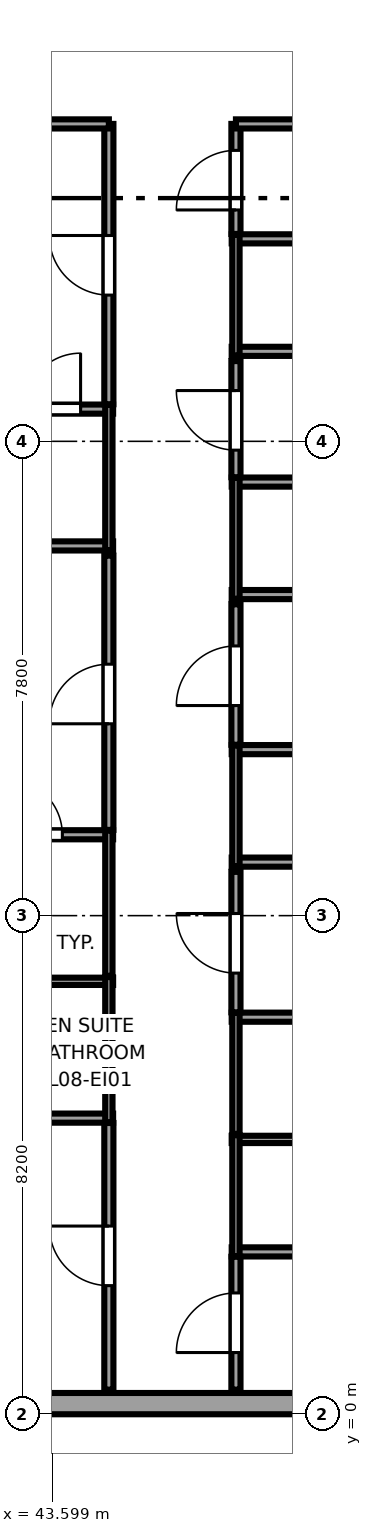
"""IFC4 building model, lengths in metres.
Left out: names, types, materials, properties, quantities, classifications, styles, units other than length and angle.
Written with IfcOpenShell. Run it as: python <this file> out.ifc"""

import sys

from ifc_helpers import new_model, si_unit, direction, frame, frame_2d, origin, place, context, subcontext, project, spatial, rectangle, extrude, source, transform, mapped, element, fill, save


model = new_model("IFC4")
c1 = context("Model", 3, precision=1e-05, world=origin(), true_north=direction((0.0, 1.0)))
c2 = subcontext(c1, "Body", "Model", "MODEL_VIEW")
j1 = project(units=[si_unit("LENGTHUNIT", "METRE"), si_unit("PLANEANGLEUNIT", "RADIAN")], contexts=[c1])
p1 = place(None, origin())
s1 = spatial("IfcSite", under=j1, at=p1, CompositionType="ELEMENT")
p2 = place(p1, origin())
s2 = spatial("IfcBuilding", under=s1, at=p2, CompositionType="ELEMENT")
p3 = place(p2, frame((0.0, 0.0, 39.1)))
s3 = spatial("IfcBuildingStorey", under=s2, at=p3, CompositionType="ELEMENT", Elevation=39.1)
p4 = place(p3, frame((34.375, 0.175, 0.0), z_axis=(0.0, 0.0, 1.0), x_axis=(1.0, 0.0, 0.0)))
e1 = element("IfcWall", 1, at=p4, inside=s3, PredefinedType="SOLIDWALL", context=c2, shape_type="SweptSolid", body=[
    extrude(rectangle(XDim=18.008, YDim=0.35, at=frame_2d((9.004, 0.0))), origin(), (0.0, 0.0, 1.0), 3.37),
])
p5 = place(p4, frame((1.801, 0.0, 0.68)))
e2 = element("IfcOpeningElement", 2, at=p5, cuts=e1, PredefinedType="OPENING", context=c2, shape_type="SweptSolid", body=[
    extrude(rectangle(XDim=1.8, YDim=1.85, at=frame_2d((0.9, 0.925))), frame((0.0, 0.185, 0.0), z_axis=(0.0, -1.0, 0.0), x_axis=(1.0, 0.0, 0.0)), (0.0, 0.0, 1.0), 0.37),
])
p6 = place(p4, frame((15.725, 0.0, 0.62)))
e3 = element("IfcOpeningElement", 3, at=p6, cuts=e1, PredefinedType="OPENING", context=c2, shape_type="SweptSolid", body=[
    extrude(rectangle(XDim=1.5, YDim=1.55, at=frame_2d((0.75, 0.775))), frame((0.0, 0.185, 0.0), z_axis=(0.0, -1.0, 0.0), x_axis=(1.0, 0.0, 0.0)), (0.0, 0.0, 1.0), 0.37),
])
p7 = place(p3, frame((42.01, 4.87, 0.0), z_axis=(0.0, 0.0, 1.0), x_axis=(1.0, 0.0, 0.0)))
e4 = element("IfcWall", 4, at=p7, inside=s3, PredefinedType="PARTITIONING", context=c2, shape_type="SweptSolid", body=[
    extrude(rectangle(XDim=2.59, YDim=0.15, at=frame_2d((1.295, 0.0))), origin(), (0.0, 0.0, 1.0), 3.37),
])
p8 = place(p3, frame((42.01, 7.12, 0.0), z_axis=(0.0, 0.0, 1.0), x_axis=(1.0, 0.0, 0.0)))
e5 = element("IfcWall", 5, at=p8, inside=s3, PredefinedType="PLUMBINGWALL", context=c2, shape_type="SweptSolid", body=[
    extrude(rectangle(XDim=2.59, YDim=0.12, at=frame_2d((1.295, 0.0))), origin(), (0.0, 0.0, 1.0), 3.37),
])
p9 = place(p3, frame((44.53, 4.8, 0.0), z_axis=(0.0, 0.0, 1.0), x_axis=(0.0, 1.0, 0.0)))
e6 = element("IfcWall", 6, at=p9, inside=s3, PredefinedType="PLUMBINGWALL", context=c2, shape_type="SweptSolid", body=[
    extrude(rectangle(XDim=2.39, YDim=0.12, at=frame_2d((1.195, 0.0))), origin(), (0.0, 0.0, 1.0), 3.37),
])
p10 = place(p3, frame((42.01, 9.53, 0.0), z_axis=(0.0, 0.0, 1.0), x_axis=(1.0, 0.0, 0.0)))
e7 = element("IfcWall", 7, at=p10, inside=s3, PredefinedType="PARTITIONING", context=c2, shape_type="SweptSolid", body=[
    extrude(rectangle(XDim=2.59, YDim=0.15, at=frame_2d((1.295, 0.0))), origin(), (0.0, 0.0, 1.0), 3.37),
])
p11 = place(p10, frame((0.835, 0.0, 0.0)))
e8 = element("IfcOpeningElement", 8, at=p11, cuts=e7, PredefinedType="OPENING", context=c2, shape_type="SweptSolid", body=[
    extrude(rectangle(XDim=0.92, YDim=2.01, at=frame_2d((0.46, 1.005))), frame((0.0, 0.085, 0.0), z_axis=(0.0, -1.0, 0.0), x_axis=(1.0, 0.0, 0.0)), (0.0, 0.0, 1.0), 0.17),
])
p12 = place(p3, frame((44.53, 7.21, 0.0), z_axis=(0.0, 0.0, 1.0), x_axis=(0.0, 1.0, 0.0)))
e9 = element("IfcWall", 9, at=p12, inside=s3, PredefinedType="PLUMBINGWALL", context=c2, shape_type="SweptSolid", body=[
    extrude(rectangle(XDim=2.39, YDim=0.12, at=frame_2d((1.195, 0.0))), origin(), (0.0, 0.0, 1.0), 3.37),
])
p13 = place(p3, frame((34.65, 14.28, 0.0), z_axis=(0.0, 0.0, 1.0), x_axis=(1.0, 0.0, 0.0)))
e10 = element("IfcWall", 10, at=p13, inside=s3, PredefinedType="PARTITIONING", context=c2, shape_type="SweptSolid", body=[
    extrude(rectangle(XDim=9.95, YDim=0.15, at=frame_2d((4.975, 0.0))), origin(), (0.0, 0.0, 1.0), 3.37),
])
p14 = place(p3, frame((42.01, 16.53, 0.0), z_axis=(0.0, 0.0, 1.0), x_axis=(1.0, 0.0, 0.0)))
e11 = element("IfcWall", 11, at=p14, inside=s3, PredefinedType="PARTITIONING", context=c2, shape_type="SweptSolid", body=[
    extrude(rectangle(XDim=2.59, YDim=0.15, at=frame_2d((1.295, 0.0))), origin(), (0.0, 0.0, 1.0), 3.37),
])
p15 = place(p14, frame((1.135, 0.0, 0.0)))
e12 = element("IfcOpeningElement", 12, at=p15, cuts=e11, PredefinedType="OPENING", context=c2, shape_type="SweptSolid", body=[
    extrude(rectangle(XDim=0.92, YDim=2.01, at=frame_2d((0.46, 1.005))), frame((0.0, 0.085, 0.0), z_axis=(0.0, -1.0, 0.0), x_axis=(1.0, 0.0, 0.0)), (0.0, 0.0, 1.0), 0.17),
])
p16 = place(p3, frame((44.53, 14.21, 0.0), z_axis=(0.0, 0.0, 1.0), x_axis=(0.0, 1.0, 0.0)))
e13 = element("IfcWall", 13, at=p16, inside=s3, PredefinedType="PLUMBINGWALL", context=c2, shape_type="SweptSolid", body=[
    extrude(rectangle(XDim=2.39, YDim=0.12, at=frame_2d((1.195, 0.0))), origin(), (0.0, 0.0, 1.0), 3.37),
])
p17 = place(p3, frame((46.55, 2.67, 0.0), z_axis=(0.0, 0.0, 1.0), x_axis=(1.0, 0.0, 0.0)))
e14 = element("IfcWall", 14, at=p17, inside=s3, PredefinedType="PARTITIONING", context=c2, shape_type="SweptSolid", body=[
    extrude(rectangle(XDim=2.59, YDim=0.15, at=frame_2d((1.295, 0.0))), origin(), (0.0, 0.0, 1.0), 3.37),
])
p18 = place(p3, frame((46.55, 4.52, 0.0), z_axis=(0.0, 0.0, 1.0), x_axis=(1.0, 0.0, 0.0)))
e15 = element("IfcWall", 15, at=p18, inside=s3, PredefinedType="PLUMBINGWALL", context=c2, shape_type="SweptSolid", body=[
    extrude(rectangle(XDim=2.59, YDim=0.12, at=frame_2d((1.295, 0.0))), origin(), (0.0, 0.0, 1.0), 3.37),
])
p19 = place(p3, frame((46.62, 2.6, 0.0), z_axis=(0.0, 0.0, 1.0), x_axis=(0.0, 1.0, 0.0)))
e16 = element("IfcWall", 16, at=p19, inside=s3, PredefinedType="PLUMBINGWALL", context=c2, shape_type="SweptSolid", body=[
    extrude(rectangle(XDim=1.99, YDim=0.12, at=frame_2d((0.995, 0.0))), origin(), (0.0, 0.0, 1.0), 3.37),
])
p20 = place(p3, frame((46.55, 6.53, 0.0), z_axis=(0.0, 0.0, 1.0), x_axis=(1.0, 0.0, 0.0)))
e17 = element("IfcWall", 17, at=p20, inside=s3, PredefinedType="PARTITIONING", context=c2, shape_type="SweptSolid", body=[
    extrude(rectangle(XDim=2.59, YDim=0.15, at=frame_2d((1.295, 0.0))), origin(), (0.0, 0.0, 1.0), 3.37),
])
p21 = place(p3, frame((46.62, 4.61, 0.0), z_axis=(0.0, 0.0, 1.0), x_axis=(0.0, 1.0, 0.0)))
e18 = element("IfcWall", 18, at=p21, inside=s3, PredefinedType="PLUMBINGWALL", context=c2, shape_type="SweptSolid", body=[
    extrude(rectangle(XDim=1.99, YDim=0.12, at=frame_2d((0.995, 0.0))), origin(), (0.0, 0.0, 1.0), 3.37),
])
p22 = place(p3, frame((46.55, 9.08, 0.0), z_axis=(0.0, 0.0, 1.0), x_axis=(1.0, 0.0, 0.0)))
e19 = element("IfcWall", 19, at=p22, inside=s3, PredefinedType="PARTITIONING", context=c2, shape_type="SweptSolid", body=[
    extrude(rectangle(XDim=10.045, YDim=0.15, at=frame_2d((5.022, 0.0))), origin(), (0.0, 0.0, 1.0), 3.37),
])
p23 = place(p3, frame((46.55, 10.93, 0.0), z_axis=(0.0, 0.0, 1.0), x_axis=(1.0, 0.0, 0.0)))
e20 = element("IfcWall", 20, at=p23, inside=s3, PredefinedType="PARTITIONING", context=c2, shape_type="SweptSolid", body=[
    extrude(rectangle(XDim=2.59, YDim=0.15, at=frame_2d((1.295, 0.0))), origin(), (0.0, 0.0, 1.0), 3.37),
])
p24 = place(p3, frame((46.62, 9.01, 0.0), z_axis=(0.0, 0.0, 1.0), x_axis=(0.0, 1.0, 0.0)))
e21 = element("IfcWall", 21, at=p24, inside=s3, PredefinedType="PLUMBINGWALL", context=c2, shape_type="SweptSolid", body=[
    extrude(rectangle(XDim=1.99, YDim=0.12, at=frame_2d((0.995, 0.0))), origin(), (0.0, 0.0, 1.0), 3.37),
])
p25 = place(p3, frame((46.55, 13.48, 0.0), z_axis=(0.0, 0.0, 1.0), x_axis=(1.0, 0.0, 0.0)))
e22 = element("IfcWall", 22, at=p25, inside=s3, PredefinedType="PARTITIONING", context=c2, shape_type="SweptSolid", body=[
    extrude(rectangle(XDim=10.045, YDim=0.15, at=frame_2d((5.022, 0.0))), origin(), (0.0, 0.0, 1.0), 3.37),
])
p26 = place(p3, frame((46.55, 15.33, 0.0), z_axis=(0.0, 0.0, 1.0), x_axis=(1.0, 0.0, 0.0)))
e23 = element("IfcWall", 23, at=p26, inside=s3, PredefinedType="PARTITIONING", context=c2, shape_type="SweptSolid", body=[
    extrude(rectangle(XDim=2.59, YDim=0.15, at=frame_2d((1.295, 0.0))), origin(), (0.0, 0.0, 1.0), 3.37),
])
p27 = place(p3, frame((46.62, 13.41, 0.0), z_axis=(0.0, 0.0, 1.0), x_axis=(0.0, 1.0, 0.0)))
e24 = element("IfcWall", 24, at=p27, inside=s3, PredefinedType="PLUMBINGWALL", context=c2, shape_type="SweptSolid", body=[
    extrude(rectangle(XDim=1.99, YDim=0.12, at=frame_2d((0.995, 0.0))), origin(), (0.0, 0.0, 1.0), 3.37),
])
p28 = place(p3, frame((46.55, 17.48, 0.0), z_axis=(0.0, 0.0, 1.0), x_axis=(1.0, 0.0, 0.0)))
e25 = element("IfcWall", 25, at=p28, inside=s3, PredefinedType="PARTITIONING", context=c2, shape_type="SweptSolid", body=[
    extrude(rectangle(XDim=10.045, YDim=0.15, at=frame_2d((5.022, 0.0))), origin(), (0.0, 0.0, 1.0), 3.37),
])
p29 = place(p3, frame((46.55, 19.33, 0.0), z_axis=(0.0, 0.0, 1.0), x_axis=(1.0, 0.0, 0.0)))
e26 = element("IfcWall", 26, at=p29, inside=s3, PredefinedType="PARTITIONING", context=c2, shape_type="SweptSolid", body=[
    extrude(rectangle(XDim=2.59, YDim=0.15, at=frame_2d((1.295, 0.0))), origin(), (0.0, 0.0, 1.0), 3.37),
])
p30 = place(p3, frame((46.62, 17.41, 0.0), z_axis=(0.0, 0.0, 1.0), x_axis=(0.0, 1.0, 0.0)))
e27 = element("IfcWall", 27, at=p30, inside=s3, PredefinedType="PLUMBINGWALL", context=c2, shape_type="SweptSolid", body=[
    extrude(rectangle(XDim=1.99, YDim=0.12, at=frame_2d((0.995, 0.0))), origin(), (0.0, 0.0, 1.0), 3.37),
])
p31 = place(p3, frame((44.53, 0.405, 0.0), z_axis=(0.0, 0.0, 1.0), x_axis=(0.0, 1.0, 0.0)))
e28 = element("IfcWall", 28, at=p31, inside=s3, PredefinedType="PARTITIONING", context=c2, shape_type="SweptSolid", body=[
    extrude(rectangle(XDim=4.385, YDim=0.15, at=frame_2d((2.192, 0.0))), origin(), (0.0, 0.0, 1.0), 3.37),
])
p32 = place(p31, frame((1.71, 0.0, 0.0)))
e29 = element("IfcOpeningElement", 29, at=p32, cuts=e28, PredefinedType="OPENING", context=c2, shape_type="SweptSolid", body=[
    extrude(rectangle(XDim=0.98, YDim=2.12, at=frame_2d((0.49, 1.06))), frame((0.0, 0.085, 0.0), z_axis=(0.0, -1.0, 0.0), x_axis=(1.0, 0.0, 0.0)), (0.0, 0.0, 1.0), 0.17),
])
p33 = place(p3, frame((44.53, 9.61, 0.0), z_axis=(0.0, 0.0, 1.0), x_axis=(0.0, 1.0, 0.0)))
e30 = element("IfcWall", 30, at=p33, inside=s3, PredefinedType="PARTITIONING", context=c2, shape_type="SweptSolid", body=[
    extrude(rectangle(XDim=4.51, YDim=0.15, at=frame_2d((2.255, 0.0))), origin(), (0.0, 0.0, 1.0), 3.37),
])
p34 = place(p33, frame((1.745, 0.0, 0.0)))
e31 = element("IfcOpeningElement", 31, at=p34, cuts=e30, PredefinedType="OPENING", context=c2, shape_type="SweptSolid", body=[
    extrude(rectangle(XDim=0.98, YDim=2.12, at=frame_2d((0.49, 1.06))), frame((0.0, 0.085, 0.0), z_axis=(0.0, -1.0, 0.0), x_axis=(1.0, 0.0, 0.0)), (0.0, 0.0, 1.0), 0.17),
])
p35 = place(p3, frame((44.53, 16.61, 0.0), z_axis=(0.0, 0.0, 1.0), x_axis=(0.0, 1.0, 0.0)))
e32 = element("IfcWall", 32, at=p35, inside=s3, PredefinedType="PARTITIONING", context=c2, shape_type="SweptSolid", body=[
    extrude(rectangle(XDim=4.61, YDim=0.15, at=frame_2d((2.305, 0.0))), origin(), (0.0, 0.0, 1.0), 3.37),
])
p36 = place(p35, frame((1.795, 0.0, 0.0)))
e33 = element("IfcOpeningElement", 33, at=p36, cuts=e32, PredefinedType="OPENING", context=c2, shape_type="SweptSolid", body=[
    extrude(rectangle(XDim=0.98, YDim=2.12, at=frame_2d((0.49, 1.06))), frame((0.0, 0.085, 0.0), z_axis=(0.0, -1.0, 0.0), x_axis=(1.0, 0.0, 0.0)), (0.0, 0.0, 1.0), 0.17),
])
p37 = place(p3, frame((34.65, 21.22, 0.0), z_axis=(0.0, 0.0, 1.0), x_axis=(1.0, 0.0, 0.0)))
e34 = element("IfcWall", 34, at=p37, inside=s3, PredefinedType="PARTITIONING", context=c2, shape_type="SweptSolid", body=[
    extrude(rectangle(XDim=9.88, YDim=0.15, at=frame_2d((4.94, 0.0))), origin(), (0.0, 0.0, 1.0), 3.37),
])
p38 = place(p3, frame((46.62, 0.405, 0.0), z_axis=(0.0, 0.0, 1.0), x_axis=(0.0, 1.0, 0.0)))
e35 = element("IfcWall", 35, at=p38, inside=s3, PredefinedType="PARTITIONING", context=c2, shape_type="SweptSolid", body=[
    extrude(rectangle(XDim=2.185, YDim=0.15, at=frame_2d((1.093, 0.0))), origin(), (0.0, 0.0, 1.0), 3.37),
])
p39 = place(p38, frame((0.61, 0.0, 0.0)))
e36 = element("IfcOpeningElement", 36, at=p39, cuts=e35, PredefinedType="OPENING", context=c2, shape_type="SweptSolid", body=[
    extrude(rectangle(XDim=0.98, YDim=2.12, at=frame_2d((0.49, 1.06))), frame((0.0, 0.085, 0.0), z_axis=(0.0, -1.0, 0.0), x_axis=(1.0, 0.0, 0.0)), (0.0, 0.0, 1.0), 0.17),
])
p40 = place(p3, frame((46.62, 6.61, 0.0), z_axis=(0.0, 0.0, 1.0), x_axis=(0.0, 1.0, 0.0)))
e37 = element("IfcWall", 37, at=p40, inside=s3, PredefinedType="PARTITIONING", context=c2, shape_type="SweptSolid", body=[
    extrude(rectangle(XDim=2.31, YDim=0.15, at=frame_2d((1.155, 0.0))), origin(), (0.0, 0.0, 1.0), 3.37),
])
p41 = place(p40, frame((0.645, 0.0, 0.0)))
e38 = element("IfcOpeningElement", 38, at=p41, cuts=e37, PredefinedType="OPENING", context=c2, shape_type="SweptSolid", body=[
    extrude(rectangle(XDim=0.98, YDim=2.12, at=frame_2d((0.49, 1.06))), frame((0.0, 0.085, 0.0), z_axis=(0.0, -1.0, 0.0), x_axis=(1.0, 0.0, 0.0)), (0.0, 0.0, 1.0), 0.17),
])
p42 = place(p3, frame((46.62, 11.01, 0.0), z_axis=(0.0, 0.0, 1.0), x_axis=(0.0, 1.0, 0.0)))
e39 = element("IfcWall", 39, at=p42, inside=s3, PredefinedType="PARTITIONING", context=c2, shape_type="SweptSolid", body=[
    extrude(rectangle(XDim=2.31, YDim=0.15, at=frame_2d((1.155, 0.0))), origin(), (0.0, 0.0, 1.0), 3.37),
])
p43 = place(p42, frame((0.645, 0.0, 0.0)))
e40 = element("IfcOpeningElement", 40, at=p43, cuts=e39, PredefinedType="OPENING", context=c2, shape_type="SweptSolid", body=[
    extrude(rectangle(XDim=0.98, YDim=2.12, at=frame_2d((0.49, 1.06))), frame((0.0, 0.085, 0.0), z_axis=(0.0, -1.0, 0.0), x_axis=(1.0, 0.0, 0.0)), (0.0, 0.0, 1.0), 0.17),
])
p44 = place(p3, frame((46.62, 15.41, 0.0), z_axis=(0.0, 0.0, 1.0), x_axis=(0.0, 1.0, 0.0)))
e41 = element("IfcWall", 41, at=p44, inside=s3, PredefinedType="PARTITIONING", context=c2, shape_type="SweptSolid", body=[
    extrude(rectangle(XDim=1.91, YDim=0.15, at=frame_2d((0.955, 0.0))), origin(), (0.0, 0.0, 1.0), 3.37),
])
p45 = place(p44, frame((0.445, 0.0, 0.0)))
e42 = element("IfcOpeningElement", 42, at=p45, cuts=e41, PredefinedType="OPENING", context=c2, shape_type="SweptSolid", body=[
    extrude(rectangle(XDim=0.98, YDim=2.12, at=frame_2d((0.49, 1.06))), frame((0.0, 0.085, 0.0), z_axis=(0.0, -1.0, 0.0), x_axis=(1.0, 0.0, 0.0)), (0.0, 0.0, 1.0), 0.17),
])
p46 = place(p3, frame((46.62, 19.41, 0.0), z_axis=(0.0, 0.0, 1.0), x_axis=(0.0, 1.0, 0.0)))
e43 = element("IfcWall", 43, at=p46, inside=s3, PredefinedType="PARTITIONING", context=c2, shape_type="SweptSolid", body=[
    extrude(rectangle(XDim=1.81, YDim=0.15, at=frame_2d((0.905, 0.0))), origin(), (0.0, 0.0, 1.0), 3.37),
])
p47 = place(p46, frame((0.395, 0.0, 0.0)))
e44 = element("IfcOpeningElement", 44, at=p47, cuts=e43, PredefinedType="OPENING", context=c2, shape_type="SweptSolid", body=[
    extrude(rectangle(XDim=0.98, YDim=2.12, at=frame_2d((0.49, 1.06))), frame((0.0, 0.085, 0.0), z_axis=(0.0, -1.0, 0.0), x_axis=(1.0, 0.0, 0.0)), (0.0, 0.0, 1.0), 0.17),
])
p48 = place(p3, frame((46.62, 21.22, 0.0), z_axis=(0.0, 0.0, 1.0), x_axis=(1.0, 0.0, 0.0)))
e45 = element("IfcWall", 45, at=p48, inside=s3, PredefinedType="PARTITIONING", context=c2, shape_type="SweptSolid", body=[
    extrude(rectangle(XDim=9.975, YDim=0.15, at=frame_2d((4.987, 0.0))), origin(), (0.0, 0.0, 1.0), 3.37),
])
m1 = source(origin(), c2, "Body", "SweptSolid", [
    extrude(rectangle(XDim=0.92, YDim=2.01, at=frame_2d((0.46, 1.005))), frame((0.0, 0.025, 0.0), z_axis=(0.0, -1.0, 0.0), x_axis=(1.0, 0.0, 0.0)), (0.0, 0.0, 1.0), 0.05),
])
p49 = place(p11, origin())
e46 = element("IfcDoor", 46, at=p49, inside=s3, OperationType="SINGLE_SWING_LEFT", PredefinedType="DOOR", context=c2, shape_type="MappedRepresentation", body=[
    mapped(m1, transform((0.0, 0.0, 0.0), x_axis=(1.0, 0.0, 0.0), y_axis=(0.0, 1.0, 0.0), z_axis=(0.0, 0.0, 1.0), scale=1.0)),
])
fill(e8, e46)
p50 = place(p15, origin())
e47 = element("IfcDoor", 47, at=p50, inside=s3, OperationType="SINGLE_SWING_RIGHT", PredefinedType="DOOR", context=c2, shape_type="MappedRepresentation", body=[
    mapped(m1, transform((0.0, 0.0, 0.0), x_axis=(1.0, 0.0, 0.0), y_axis=(0.0, 1.0, 0.0), z_axis=(0.0, 0.0, 1.0), scale=1.0)),
])
fill(e12, e47)
m2 = source(origin(), c2, "Body", "SweptSolid", [
    extrude(rectangle(XDim=0.98, YDim=2.12, at=frame_2d((0.49, 1.06))), frame((0.0, 0.025, 0.0), z_axis=(0.0, -1.0, 0.0), x_axis=(1.0, 0.0, 0.0)), (0.0, 0.0, 1.0), 0.05),
])
p51 = place(p32, origin())
e48 = element("IfcDoor", 48, at=p51, inside=s3, OperationType="SINGLE_SWING_RIGHT", PredefinedType="DOOR", context=c2, shape_type="MappedRepresentation", body=[
    mapped(m2, transform((0.0, 0.0, 0.0), x_axis=(1.0, 0.0, 0.0), y_axis=(0.0, 1.0, 0.0), z_axis=(0.0, 0.0, 1.0), scale=1.0)),
])
fill(e29, e48)
p52 = place(p34, origin())
e49 = element("IfcDoor", 49, at=p52, inside=s3, OperationType="SINGLE_SWING_LEFT", PredefinedType="DOOR", context=c2, shape_type="MappedRepresentation", body=[
    mapped(m2, transform((0.0, 0.0, 0.0), x_axis=(1.0, 0.0, 0.0), y_axis=(0.0, 1.0, 0.0), z_axis=(0.0, 0.0, 1.0), scale=1.0)),
])
fill(e31, e49)
p53 = place(p36, origin())
e50 = element("IfcDoor", 50, at=p53, inside=s3, OperationType="SINGLE_SWING_RIGHT", PredefinedType="DOOR", context=c2, shape_type="MappedRepresentation", body=[
    mapped(m2, transform((0.0, 0.0, 0.0), x_axis=(1.0, 0.0, 0.0), y_axis=(0.0, 1.0, 0.0), z_axis=(0.0, 0.0, 1.0), scale=1.0)),
])
fill(e33, e50)
p54 = place(p39, origin())
e51 = element("IfcDoor", 51, at=p54, inside=s3, OperationType="SINGLE_SWING_LEFT", PredefinedType="DOOR", context=c2, shape_type="MappedRepresentation", body=[
    mapped(m2, transform((0.0, 0.0, 0.0), x_axis=(1.0, 0.0, 0.0), y_axis=(0.0, 1.0, 0.0), z_axis=(0.0, 0.0, 1.0), scale=1.0)),
])
fill(e36, e51)
p55 = place(p41, origin())
e52 = element("IfcDoor", 52, at=p55, inside=s3, OperationType="SINGLE_SWING_RIGHT", PredefinedType="DOOR", context=c2, shape_type="MappedRepresentation", body=[
    mapped(m2, transform((0.0, 0.0, 0.0), x_axis=(1.0, 0.0, 0.0), y_axis=(0.0, 1.0, 0.0), z_axis=(0.0, 0.0, 1.0), scale=1.0)),
])
fill(e38, e52)
p56 = place(p43, origin())
e53 = element("IfcDoor", 53, at=p56, inside=s3, OperationType="SINGLE_SWING_LEFT", PredefinedType="DOOR", context=c2, shape_type="MappedRepresentation", body=[
    mapped(m2, transform((0.0, 0.0, 0.0), x_axis=(1.0, 0.0, 0.0), y_axis=(0.0, 1.0, 0.0), z_axis=(0.0, 0.0, 1.0), scale=1.0)),
])
fill(e40, e53)
p57 = place(p45, origin())
e54 = element("IfcDoor", 54, at=p57, inside=s3, OperationType="SINGLE_SWING_RIGHT", PredefinedType="DOOR", context=c2, shape_type="MappedRepresentation", body=[
    mapped(m2, transform((0.0, 0.0, 0.0), x_axis=(1.0, 0.0, 0.0), y_axis=(0.0, 1.0, 0.0), z_axis=(0.0, 0.0, 1.0), scale=1.0)),
])
fill(e42, e54)
p58 = place(p47, origin())
e55 = element("IfcDoor", 55, at=p58, inside=s3, OperationType="SINGLE_SWING_LEFT", PredefinedType="DOOR", context=c2, shape_type="MappedRepresentation", body=[
    mapped(m2, transform((0.0, 0.0, 0.0), x_axis=(1.0, 0.0, 0.0), y_axis=(0.0, 1.0, 0.0), z_axis=(0.0, 0.0, 1.0), scale=1.0)),
])
fill(e44, e55)
save(model, sys.argv[1])
